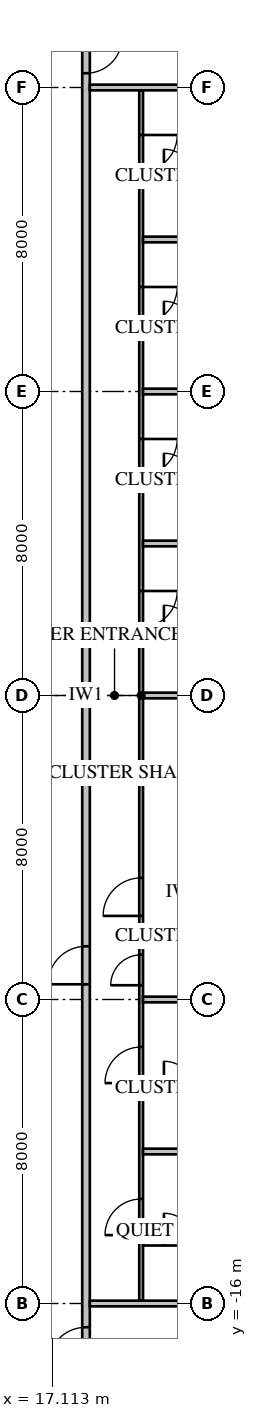
"""IFC4 building model, lengths in metres.
Left out: names, types, materials, properties, quantities, classifications, styles, units other than length and angle.
Written with IfcOpenShell. Run it as: python <this file> out.ifc"""

import sys

from ifc_helpers import new_model, si_unit, direction, frame, frame_2d, origin, place, context, subcontext, project, spatial, rectangle, extrude, element, fill, save


model = new_model("IFC4")
c1 = context("Model", 3, precision=1e-05, world=origin(), true_north=direction((0.0, 1.0)))
c2 = subcontext(c1, "Body", "Model", "MODEL_VIEW")
j1 = project(units=[si_unit("LENGTHUNIT", "METRE"), si_unit("PLANEANGLEUNIT", "RADIAN")], contexts=[c1])
p1 = place(None, origin())
s1 = spatial("IfcSite", under=j1, at=p1, CompositionType="ELEMENT")
p2 = place(p1, origin())
s2 = spatial("IfcBuilding", under=s1, at=p2, CompositionType="ELEMENT")
p3 = place(p2, frame((0.0, 0.0, 19.85)))
s3 = spatial("IfcBuildingStorey", under=s2, at=p3, CompositionType="ELEMENT", Elevation=19.85)
p4 = place(p3, frame((18.0, -18.0, 0.0), z_axis=(0.0, 0.0, 1.0), x_axis=(0.0, 1.0, 0.0)))
e1 = element("IfcWall", 1, at=p4, inside=s3, PredefinedType="PARTITIONING", context=c2, shape_type="SweptSolid", body=[
    extrude(rectangle(XDim=36.0, YDim=0.2, at=frame_2d((18.0, 0.0))), origin(), (0.0, 0.0, 1.0), 3.65),
])
p5 = place(p4, frame((10.4, 0.0, 0.0)))
e2 = element("IfcOpeningElement", 2, at=p5, cuts=e1, PredefinedType="OPENING", context=c2, shape_type="SweptSolid", body=[
    extrude(rectangle(XDim=1.0, YDim=2.1, at=frame_2d((0.5, 1.05))), frame((0.0, 0.12, 0.0), z_axis=(0.0, -1.0, 0.0), x_axis=(1.0, 0.0, 0.0)), (0.0, 0.0, 1.0), 0.24),
])
p6 = place(p4, frame((0.375, 0.0, 0.0)))
e3 = element("IfcOpeningElement", 3, at=p6, cuts=e1, PredefinedType="OPENING", context=c2, shape_type="SweptSolid", body=[
    extrude(rectangle(XDim=1.0, YDim=2.1, at=frame_2d((0.5, 1.05))), frame((0.0, 0.12, 0.0), z_axis=(0.0, -1.0, 0.0), x_axis=(1.0, 0.0, 0.0)), (0.0, 0.0, 1.0), 0.24),
])
p7 = place(p4, frame((34.375, 0.0, 0.0)))
e4 = element("IfcOpeningElement", 4, at=p7, cuts=e1, PredefinedType="OPENING", context=c2, shape_type="SweptSolid", body=[
    extrude(rectangle(XDim=0.95, YDim=2.1, at=frame_2d((0.475, 1.05))), frame((0.0, 0.12, 0.0), z_axis=(0.0, -1.0, 0.0), x_axis=(1.0, 0.0, 0.0)), (0.0, 0.0, 1.0), 0.24),
])
p8 = place(p3, frame((19.45, -15.925, 0.0), z_axis=(0.0, 0.0, 1.0), x_axis=(0.0, 1.0, 0.0)))
e5 = element("IfcWall", 5, at=p8, inside=s3, PredefinedType="PARTITIONING", context=c2, shape_type="SweptSolid", body=[
    extrude(rectangle(XDim=31.85, YDim=0.1, at=frame_2d((15.925, 0.0))), origin(), (0.0, 0.0, 1.0), 3.65),
])
p9 = place(p8, frame((10.125, 0.0, 0.0)))
e6 = element("IfcOpeningElement", 6, at=p9, cuts=e5, PredefinedType="OPENING", context=c2, shape_type="SweptSolid", body=[
    extrude(rectangle(XDim=1.0, YDim=2.1, at=frame_2d((0.5, 1.05))), frame((0.0, 0.07, 0.0), z_axis=(0.0, -1.0, 0.0), x_axis=(1.0, 0.0, 0.0)), (0.0, 0.0, 1.0), 0.14),
])
p10 = place(p8, frame((8.3, 0.0, 0.0)))
e7 = element("IfcOpeningElement", 7, at=p10, cuts=e5, PredefinedType="OPENING", context=c2, shape_type="SweptSolid", body=[
    extrude(rectangle(XDim=0.8, YDim=2.1, at=frame_2d((0.4, 1.05))), frame((0.0, 0.07, 0.0), z_axis=(0.0, -1.0, 0.0), x_axis=(1.0, 0.0, 0.0)), (0.0, 0.0, 1.0), 0.14),
])
p11 = place(p8, frame((1.725, 0.0, 0.0)))
e8 = element("IfcOpeningElement", 8, at=p11, cuts=e5, PredefinedType="OPENING", context=c2, shape_type="SweptSolid", body=[
    extrude(rectangle(XDim=0.95, YDim=2.1, at=frame_2d((0.475, 1.05))), frame((0.0, 0.07, 0.0), z_axis=(0.0, -1.0, 0.0), x_axis=(1.0, 0.0, 0.0)), (0.0, 0.0, 1.0), 0.14),
])
p12 = place(p8, frame((5.725, 0.0, 0.0)))
e9 = element("IfcOpeningElement", 9, at=p12, cuts=e5, PredefinedType="OPENING", context=c2, shape_type="SweptSolid", body=[
    extrude(rectangle(XDim=0.95, YDim=2.1, at=frame_2d((0.475, 1.05))), frame((0.0, 0.07, 0.0), z_axis=(0.0, -1.0, 0.0), x_axis=(1.0, 0.0, 0.0)), (0.0, 0.0, 1.0), 0.14),
])
p13 = place(p8, frame((17.725, 0.0, 0.0)))
e10 = element("IfcOpeningElement", 10, at=p13, cuts=e5, PredefinedType="OPENING", context=c2, shape_type="SweptSolid", body=[
    extrude(rectangle(XDim=0.95, YDim=2.1, at=frame_2d((0.475, 1.05))), frame((0.0, 0.07, 0.0), z_axis=(0.0, -1.0, 0.0), x_axis=(1.0, 0.0, 0.0)), (0.0, 0.0, 1.0), 0.14),
])
p14 = place(p8, frame((21.725, 0.0, 0.0)))
e11 = element("IfcOpeningElement", 11, at=p14, cuts=e5, PredefinedType="OPENING", context=c2, shape_type="SweptSolid", body=[
    extrude(rectangle(XDim=0.95, YDim=2.1, at=frame_2d((0.475, 1.05))), frame((0.0, 0.07, 0.0), z_axis=(0.0, -1.0, 0.0), x_axis=(1.0, 0.0, 0.0)), (0.0, 0.0, 1.0), 0.14),
])
p15 = place(p8, frame((25.725, 0.0, 0.0)))
e12 = element("IfcOpeningElement", 12, at=p15, cuts=e5, PredefinedType="OPENING", context=c2, shape_type="SweptSolid", body=[
    extrude(rectangle(XDim=0.95, YDim=2.1, at=frame_2d((0.475, 1.05))), frame((0.0, 0.07, 0.0), z_axis=(0.0, -1.0, 0.0), x_axis=(1.0, 0.0, 0.0)), (0.0, 0.0, 1.0), 0.14),
])
p16 = place(p8, frame((29.725, 0.0, 0.0)))
e13 = element("IfcOpeningElement", 13, at=p16, cuts=e5, PredefinedType="OPENING", context=c2, shape_type="SweptSolid", body=[
    extrude(rectangle(XDim=0.95, YDim=2.1, at=frame_2d((0.475, 1.05))), frame((0.0, 0.07, 0.0), z_axis=(0.0, -1.0, 0.0), x_axis=(1.0, 0.0, 0.0)), (0.0, 0.0, 1.0), 0.14),
])
p17 = place(p3, frame((19.5, -6.275, 0.0), z_axis=(0.0, 0.0, 1.0), x_axis=(1.0, 0.0, 0.0)))
e14 = element("IfcWall", 14, at=p17, inside=s3, PredefinedType="PARTITIONING", context=c2, shape_type="SweptSolid", body=[
    extrude(rectangle(XDim=2.1, YDim=0.1, at=frame_2d((1.05, 0.0))), origin(), (0.0, 0.0, 1.0), 3.65),
])
p18 = place(p3, frame((18.1, -16.0, 0.0), z_axis=(0.0, 0.0, 1.0), x_axis=(1.0, 0.0, 0.0)))
e15 = element("IfcWall", 15, at=p18, inside=s3, PredefinedType="PARTITIONING", context=c2, shape_type="SweptSolid", body=[
    extrude(rectangle(XDim=6.589, YDim=0.15, at=frame_2d((3.295, 0.0))), origin(), (0.0, 0.0, 1.0), 3.65),
])
for number, where, z_axis, x_axis in (
    (16, (19.5, -12.0, 0.0), (0.0, 0.0, 1.0), (1.0, 0.0, 0.0)),
    (17, (19.5, -8.0, 0.0), (0.0, 0.0, 1.0), (1.0, 0.0, 0.0)),
):
    element("IfcWall", number, at=place(p3, frame(where, z_axis=z_axis, x_axis=x_axis)), inside=s3, PredefinedType="PARTITIONING", context=c2, shape_type="SweptSolid", body=[
        extrude(rectangle(XDim=5.2, YDim=0.15, at=frame_2d((2.6, 0.0))), origin(), (0.0, 0.0, 1.0), 3.65),
    ])
p19 = place(p3, frame((19.5, 0.0, 0.0), z_axis=(0.0, 0.0, 1.0), x_axis=(1.0, 0.0, 0.0)))
e18 = element("IfcWall", 18, at=p19, inside=s3, PredefinedType="PARTITIONING", context=c2, shape_type="SweptSolid", body=[
    extrude(rectangle(XDim=5.2, YDim=0.15, at=frame_2d((2.6, 0.0))), origin(), (0.0, 0.0, 1.0), 2.957),
])
for number, where, z_axis, x_axis in (
    (19, (19.5, 4.0, 0.0), (0.0, 0.0, 1.0), (1.0, 0.0, 0.0)),
    (20, (19.5, 8.0, 0.0), (0.0, 0.0, 1.0), (1.0, 0.0, 0.0)),
    (21, (19.5, 12.0, 0.0), (0.0, 0.0, 1.0), (1.0, 0.0, 0.0)),
):
    element("IfcWall", number, at=place(p3, frame(where, z_axis=z_axis, x_axis=x_axis)), inside=s3, PredefinedType="PARTITIONING", context=c2, shape_type="SweptSolid", body=[
        extrude(rectangle(XDim=5.2, YDim=0.15, at=frame_2d((2.6, 0.0))), origin(), (0.0, 0.0, 1.0), 3.65),
    ])
p20 = place(p3, frame((18.1, 16.0, 0.0), z_axis=(0.0, 0.0, 1.0), x_axis=(1.0, 0.0, 0.0)))
e22 = element("IfcWall", 22, at=p20, inside=s3, PredefinedType="PARTITIONING", context=c2, shape_type="SweptSolid", body=[
    extrude(rectangle(XDim=6.589, YDim=0.15, at=frame_2d((3.295, 0.0))), origin(), (0.0, 0.0, 1.0), 3.65),
])
p21 = place(p3, frame((19.5, -14.425, 0.0), z_axis=(0.0, 0.0, 1.0), x_axis=(1.0, 0.0, 0.0)))
e23 = element("IfcWall", 23, at=p21, inside=s3, PredefinedType="PARTITIONING", context=c2, shape_type="SweptSolid", body=[
    extrude(rectangle(XDim=2.7, YDim=0.1, at=frame_2d((1.35, 0.0))), origin(), (0.0, 0.0, 1.0), 3.65),
])
p22 = place(p21, frame((0.55, 0.0, 0.0)))
e24 = element("IfcOpeningElement", 24, at=p22, cuts=e23, PredefinedType="OPENING", context=c2, shape_type="SweptSolid", body=[
    extrude(rectangle(XDim=0.8, YDim=2.1, at=frame_2d((0.4, 1.05))), frame((0.0, 0.07, 0.0), z_axis=(0.0, -1.0, 0.0), x_axis=(1.0, 0.0, 0.0)), (0.0, 0.0, 1.0), 0.14),
])
p23 = place(p3, frame((19.5, -10.425, 0.0), z_axis=(0.0, 0.0, 1.0), x_axis=(1.0, 0.0, 0.0)))
e25 = element("IfcWall", 25, at=p23, inside=s3, PredefinedType="PARTITIONING", context=c2, shape_type="SweptSolid", body=[
    extrude(rectangle(XDim=2.7, YDim=0.1, at=frame_2d((1.35, 0.0))), origin(), (0.0, 0.0, 1.0), 3.65),
])
p24 = place(p23, frame((0.55, 0.0, 0.0)))
e26 = element("IfcOpeningElement", 26, at=p24, cuts=e25, PredefinedType="OPENING", context=c2, shape_type="SweptSolid", body=[
    extrude(rectangle(XDim=0.8, YDim=2.1, at=frame_2d((0.4, 1.05))), frame((0.0, 0.07, 0.0), z_axis=(0.0, -1.0, 0.0), x_axis=(1.0, 0.0, 0.0)), (0.0, 0.0, 1.0), 0.14),
])
p25 = place(p3, frame((19.5, 1.575, 0.0), z_axis=(0.0, 0.0, 1.0), x_axis=(1.0, 0.0, 0.0)))
e27 = element("IfcWall", 27, at=p25, inside=s3, PredefinedType="PARTITIONING", context=c2, shape_type="SweptSolid", body=[
    extrude(rectangle(XDim=2.7, YDim=0.1, at=frame_2d((1.35, 0.0))), origin(), (0.0, 0.0, 1.0), 3.65),
])
p26 = place(p25, frame((0.55, 0.0, 0.0)))
e28 = element("IfcOpeningElement", 28, at=p26, cuts=e27, PredefinedType="OPENING", context=c2, shape_type="SweptSolid", body=[
    extrude(rectangle(XDim=0.8, YDim=2.1, at=frame_2d((0.4, 1.05))), frame((0.0, 0.07, 0.0), z_axis=(0.0, -1.0, 0.0), x_axis=(1.0, 0.0, 0.0)), (0.0, 0.0, 1.0), 0.14),
])
p27 = place(p3, frame((19.5, 5.575, 0.0), z_axis=(0.0, 0.0, 1.0), x_axis=(1.0, 0.0, 0.0)))
e29 = element("IfcWall", 29, at=p27, inside=s3, PredefinedType="PARTITIONING", context=c2, shape_type="SweptSolid", body=[
    extrude(rectangle(XDim=2.7, YDim=0.1, at=frame_2d((1.35, 0.0))), origin(), (0.0, 0.0, 1.0), 3.65),
])
p28 = place(p27, frame((0.55, 0.0, 0.0)))
e30 = element("IfcOpeningElement", 30, at=p28, cuts=e29, PredefinedType="OPENING", context=c2, shape_type="SweptSolid", body=[
    extrude(rectangle(XDim=0.8, YDim=2.1, at=frame_2d((0.4, 1.05))), frame((0.0, 0.07, 0.0), z_axis=(0.0, -1.0, 0.0), x_axis=(1.0, 0.0, 0.0)), (0.0, 0.0, 1.0), 0.14),
])
p29 = place(p3, frame((19.5, 9.575, 0.0), z_axis=(0.0, 0.0, 1.0), x_axis=(1.0, 0.0, 0.0)))
e31 = element("IfcWall", 31, at=p29, inside=s3, PredefinedType="PARTITIONING", context=c2, shape_type="SweptSolid", body=[
    extrude(rectangle(XDim=2.7, YDim=0.1, at=frame_2d((1.35, 0.0))), origin(), (0.0, 0.0, 1.0), 3.65),
])
p30 = place(p29, frame((0.55, 0.0, 0.0)))
e32 = element("IfcOpeningElement", 32, at=p30, cuts=e31, PredefinedType="OPENING", context=c2, shape_type="SweptSolid", body=[
    extrude(rectangle(XDim=0.8, YDim=2.1, at=frame_2d((0.4, 1.05))), frame((0.0, 0.07, 0.0), z_axis=(0.0, -1.0, 0.0), x_axis=(1.0, 0.0, 0.0)), (0.0, 0.0, 1.0), 0.14),
])
p31 = place(p3, frame((19.5, 13.575, 0.0), z_axis=(0.0, 0.0, 1.0), x_axis=(1.0, 0.0, 0.0)))
e33 = element("IfcWall", 33, at=p31, inside=s3, PredefinedType="PARTITIONING", context=c2, shape_type="SweptSolid", body=[
    extrude(rectangle(XDim=2.7, YDim=0.1, at=frame_2d((1.35, 0.0))), origin(), (0.0, 0.0, 1.0), 3.65),
])
p32 = place(p31, frame((0.55, 0.0, 0.0)))
e34 = element("IfcOpeningElement", 34, at=p32, cuts=e33, PredefinedType="OPENING", context=c2, shape_type="SweptSolid", body=[
    extrude(rectangle(XDim=0.8, YDim=2.1, at=frame_2d((0.4, 1.05))), frame((0.0, 0.07, 0.0), z_axis=(0.0, -1.0, 0.0), x_axis=(1.0, 0.0, 0.0)), (0.0, 0.0, 1.0), 0.14),
])
p33 = place(p5, origin())
e35 = element("IfcDoor", 35, at=p33, inside=s3, OperationType="SINGLE_SWING_LEFT", PredefinedType="DOOR", context=c2, shape_type="SweptSolid", body=[
    extrude(rectangle(XDim=1.0, YDim=2.1, at=frame_2d((0.5, 1.05))), frame((0.0, 0.025, 0.0), z_axis=(0.0, -1.0, 0.0), x_axis=(1.0, 0.0, 0.0)), (0.0, 0.0, 1.0), 0.05),
])
fill(e2, e35)
p34 = place(p9, origin())
e36 = element("IfcDoor", 36, at=p34, inside=s3, OperationType="SINGLE_SWING_LEFT", PredefinedType="DOOR", context=c2, shape_type="SweptSolid", body=[
    extrude(rectangle(XDim=1.0, YDim=2.1, at=frame_2d((0.5, 1.05))), frame((0.0, 0.025, 0.0), z_axis=(0.0, -1.0, 0.0), x_axis=(1.0, 0.0, 0.0)), (0.0, 0.0, 1.0), 0.05),
])
fill(e6, e36)
p35 = place(p10, origin())
e37 = element("IfcDoor", 37, at=p35, inside=s3, OperationType="SINGLE_SWING_LEFT", PredefinedType="DOOR", context=c2, shape_type="SweptSolid", body=[
    extrude(rectangle(XDim=0.8, YDim=2.1, at=frame_2d((0.4, 1.05))), frame((0.0, 0.025, 0.0), z_axis=(0.0, -1.0, 0.0), x_axis=(1.0, 0.0, 0.0)), (0.0, 0.0, 1.0), 0.05),
])
fill(e7, e37)
p36 = place(p6, origin())
e38 = element("IfcDoor", 38, at=p36, inside=s3, OperationType="SINGLE_SWING_LEFT", PredefinedType="DOOR", context=c2, shape_type="SweptSolid", body=[
    extrude(rectangle(XDim=1.0, YDim=2.1, at=frame_2d((0.5, 1.05))), frame((0.0, 0.025, 0.0), z_axis=(0.0, -1.0, 0.0), x_axis=(1.0, 0.0, 0.0)), (0.0, 0.0, 1.0), 0.05),
])
fill(e3, e38)
p37 = place(p11, origin())
e39 = element("IfcDoor", 39, at=p37, inside=s3, OperationType="SINGLE_SWING_LEFT", PredefinedType="DOOR", context=c2, shape_type="SweptSolid", body=[
    extrude(rectangle(XDim=0.95, YDim=2.1, at=frame_2d((0.475, 1.05))), frame((0.0, 0.025, 0.0), z_axis=(0.0, -1.0, 0.0), x_axis=(1.0, 0.0, 0.0)), (0.0, 0.0, 1.0), 0.05),
])
fill(e8, e39)
p38 = place(p22, origin())
e40 = element("IfcDoor", 40, at=p38, inside=s3, OperationType="SINGLE_SWING_LEFT", PredefinedType="DOOR", context=c2, shape_type="SweptSolid", body=[
    extrude(rectangle(XDim=0.8, YDim=2.1, at=frame_2d((0.4, 1.05))), frame((0.0, 0.025, 0.0), z_axis=(0.0, -1.0, 0.0), x_axis=(1.0, 0.0, 0.0)), (0.0, 0.0, 1.0), 0.05),
])
fill(e24, e40)
p39 = place(p12, origin())
e41 = element("IfcDoor", 41, at=p39, inside=s3, OperationType="SINGLE_SWING_LEFT", PredefinedType="DOOR", context=c2, shape_type="SweptSolid", body=[
    extrude(rectangle(XDim=0.95, YDim=2.1, at=frame_2d((0.475, 1.05))), frame((0.0, 0.025, 0.0), z_axis=(0.0, -1.0, 0.0), x_axis=(1.0, 0.0, 0.0)), (0.0, 0.0, 1.0), 0.05),
])
fill(e9, e41)
p40 = place(p24, origin())
e42 = element("IfcDoor", 42, at=p40, inside=s3, OperationType="SINGLE_SWING_LEFT", PredefinedType="DOOR", context=c2, shape_type="SweptSolid", body=[
    extrude(rectangle(XDim=0.8, YDim=2.1, at=frame_2d((0.4, 1.05))), frame((0.0, 0.025, 0.0), z_axis=(0.0, -1.0, 0.0), x_axis=(1.0, 0.0, 0.0)), (0.0, 0.0, 1.0), 0.05),
])
fill(e26, e42)
p41 = place(p13, origin())
e43 = element("IfcDoor", 43, at=p41, inside=s3, OperationType="SINGLE_SWING_RIGHT", PredefinedType="DOOR", context=c2, shape_type="SweptSolid", body=[
    extrude(rectangle(XDim=0.95, YDim=2.1, at=frame_2d((0.475, 1.05))), frame((0.0, 0.025, 0.0), z_axis=(0.0, -1.0, 0.0), x_axis=(1.0, 0.0, 0.0)), (0.0, 0.0, 1.0), 0.05),
])
fill(e10, e43)
p42 = place(p26, origin())
e44 = element("IfcDoor", 44, at=p42, inside=s3, OperationType="SINGLE_SWING_LEFT", PredefinedType="DOOR", context=c2, shape_type="SweptSolid", body=[
    extrude(rectangle(XDim=0.8, YDim=2.1, at=frame_2d((0.4, 1.05))), frame((0.0, 0.025, 0.0), z_axis=(0.0, -1.0, 0.0), x_axis=(1.0, 0.0, 0.0)), (0.0, 0.0, 1.0), 0.05),
])
fill(e28, e44)
p43 = place(p14, origin())
e45 = element("IfcDoor", 45, at=p43, inside=s3, OperationType="SINGLE_SWING_RIGHT", PredefinedType="DOOR", context=c2, shape_type="SweptSolid", body=[
    extrude(rectangle(XDim=0.95, YDim=2.1, at=frame_2d((0.475, 1.05))), frame((0.0, 0.025, 0.0), z_axis=(0.0, -1.0, 0.0), x_axis=(1.0, 0.0, 0.0)), (0.0, 0.0, 1.0), 0.05),
])
fill(e11, e45)
p44 = place(p28, origin())
e46 = element("IfcDoor", 46, at=p44, inside=s3, OperationType="SINGLE_SWING_LEFT", PredefinedType="DOOR", context=c2, shape_type="SweptSolid", body=[
    extrude(rectangle(XDim=0.8, YDim=2.1, at=frame_2d((0.4, 1.05))), frame((0.0, 0.025, 0.0), z_axis=(0.0, -1.0, 0.0), x_axis=(1.0, 0.0, 0.0)), (0.0, 0.0, 1.0), 0.05),
])
fill(e30, e46)
p45 = place(p15, origin())
e47 = element("IfcDoor", 47, at=p45, inside=s3, OperationType="SINGLE_SWING_RIGHT", PredefinedType="DOOR", context=c2, shape_type="SweptSolid", body=[
    extrude(rectangle(XDim=0.95, YDim=2.1, at=frame_2d((0.475, 1.05))), frame((0.0, 0.025, 0.0), z_axis=(0.0, -1.0, 0.0), x_axis=(1.0, 0.0, 0.0)), (0.0, 0.0, 1.0), 0.05),
])
fill(e12, e47)
p46 = place(p30, origin())
e48 = element("IfcDoor", 48, at=p46, inside=s3, OperationType="SINGLE_SWING_LEFT", PredefinedType="DOOR", context=c2, shape_type="SweptSolid", body=[
    extrude(rectangle(XDim=0.8, YDim=2.1, at=frame_2d((0.4, 1.05))), frame((0.0, 0.025, 0.0), z_axis=(0.0, -1.0, 0.0), x_axis=(1.0, 0.0, 0.0)), (0.0, 0.0, 1.0), 0.05),
])
fill(e32, e48)
p47 = place(p16, origin())
e49 = element("IfcDoor", 49, at=p47, inside=s3, OperationType="SINGLE_SWING_RIGHT", PredefinedType="DOOR", context=c2, shape_type="SweptSolid", body=[
    extrude(rectangle(XDim=0.95, YDim=2.1, at=frame_2d((0.475, 1.05))), frame((0.0, 0.025, 0.0), z_axis=(0.0, -1.0, 0.0), x_axis=(1.0, 0.0, 0.0)), (0.0, 0.0, 1.0), 0.05),
])
fill(e13, e49)
p48 = place(p32, origin())
e50 = element("IfcDoor", 50, at=p48, inside=s3, OperationType="SINGLE_SWING_LEFT", PredefinedType="DOOR", context=c2, shape_type="SweptSolid", body=[
    extrude(rectangle(XDim=0.8, YDim=2.1, at=frame_2d((0.4, 1.05))), frame((0.0, 0.025, 0.0), z_axis=(0.0, -1.0, 0.0), x_axis=(1.0, 0.0, 0.0)), (0.0, 0.0, 1.0), 0.05),
])
fill(e34, e50)
p49 = place(p7, origin())
e51 = element("IfcDoor", 51, at=p49, inside=s3, OperationType="SINGLE_SWING_RIGHT", PredefinedType="DOOR", context=c2, shape_type="SweptSolid", body=[
    extrude(rectangle(XDim=0.95, YDim=2.1, at=frame_2d((0.475, 1.05))), frame((0.0, 0.025, 0.0), z_axis=(0.0, -1.0, 0.0), x_axis=(1.0, 0.0, 0.0)), (0.0, 0.0, 1.0), 0.05),
])
fill(e4, e51)
save(model, sys.argv[1])
